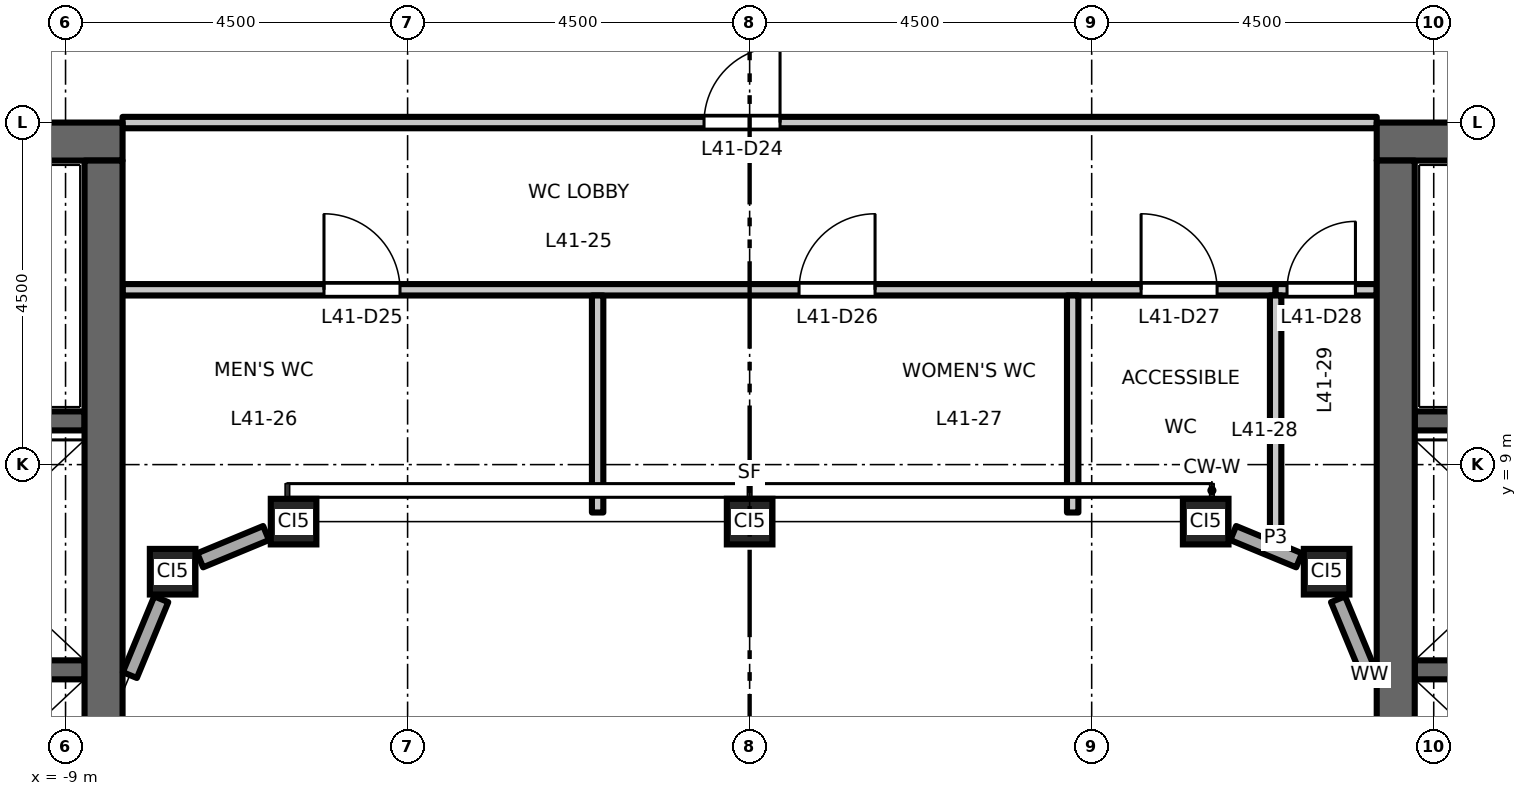
"""IFC4 building model, lengths in metres.
Left out: names, types, materials, properties, quantities, classifications, styles, units other than length and angle.
Written with IfcOpenShell. Run it as: python <this file> out.ifc"""

import sys

from ifc_helpers import new_model, si_unit, direction, frame, frame_2d, origin, origin_2d, place, context, subcontext, project, spatial, rectangle, hollow_rectangle, extrude, element, fill, save


model = new_model("IFC4")
c1 = context("Model", 3, precision=1e-05, world=origin(), true_north=direction((0.0, 1.0)))
c2 = subcontext(c1, "Body", "Model", "MODEL_VIEW")
j1 = project(units=[si_unit("LENGTHUNIT", "METRE"), si_unit("PLANEANGLEUNIT", "RADIAN")], contexts=[c1])
p1 = place(None, origin())
s1 = spatial("IfcSite", under=j1, at=p1, CompositionType="ELEMENT")
p2 = place(p1, origin())
s2 = spatial("IfcBuilding", under=s1, at=p2, CompositionType="ELEMENT")
p3 = place(p2, frame((0.0, 0.0, 192.7)))
s3 = spatial("IfcBuildingStorey", under=s2, at=p3, CompositionType="ELEMENT", Elevation=192.7)
for number, where, z_axis, x_axis in (
    (1, (-7.591, 7.591, 0.0), (0.0, 0.0, 1.0), (1.0, 0.0, 0.0)),
    (2, (-6.0, 8.25, 0.0), (0.0, 0.0, 1.0), (1.0, 0.0, 0.0)),
    (3, (0.0, 8.25, 0.0), (0.0, 0.0, 1.0), (1.0, 0.0, 0.0)),
    (4, (6.0, 8.25, 0.0), (0.0, 0.0, 1.0), (1.0, 0.0, 0.0)),
    (5, (7.591, 7.591, 0.0), (0.0, 0.0, 1.0), (1.0, 0.0, 0.0)),
):
    element("IfcColumn", number, at=place(p3, frame(where, z_axis=z_axis, x_axis=x_axis)), inside=s3, PredefinedType="COLUMN", context=c2, shape_type="SweptSolid", body=[
        extrude(hollow_rectangle(XDim=0.6, YDim=0.6, WallThickness=0.032, at=origin_2d()), origin(), (0.0, 0.0, 1.0), 4.5),
    ])
p4 = place(p3, frame((-8.75, 6.3, 0.0), z_axis=(0.0, 0.0, 1.0), x_axis=(-1.0, 0.0, 0.0)))
e6 = element("IfcWall", 6, at=p4, inside=s3, PredefinedType="SHEAR", context=c2, shape_type="SweptSolid", body=[
    extrude(rectangle(XDim=3.1, YDim=0.25, at=frame_2d((1.55, 0.0))), origin(), (0.0, 0.0, 1.0), 4.35),
])
p5 = place(p3, frame((-8.75, 9.575, 0.0), z_axis=(0.0, 0.0, 1.0), x_axis=(-1.0, 0.0, 0.0)))
e7 = element("IfcWall", 7, at=p5, inside=s3, PredefinedType="SHEAR", context=c2, shape_type="SweptSolid", body=[
    extrude(rectangle(XDim=8.0, YDim=0.25, at=frame_2d((4.0, 0.0))), origin(), (0.0, 0.0, 1.0), 4.35),
])
p6 = place(p5, frame((6.65, 0.0, 0.0)))
e8 = element("IfcOpeningElement", 8, at=p6, cuts=e7, PredefinedType="OPENING", context=c2, shape_type="SweptSolid", body=[
    extrude(rectangle(XDim=1.1, YDim=2.1, at=frame_2d((0.55, 1.05))), frame((0.0, 0.135, 0.0), z_axis=(0.0, -1.0, 0.0), x_axis=(1.0, 0.0, 0.0)), (0.0, 0.0, 1.0), 0.27),
])
p7 = place(p3, frame((-8.25, 13.25, 0.0), z_axis=(0.0, 0.0, 1.0), x_axis=(-1.0, 0.0, 0.0)))
e9 = element("IfcWall", 9, at=p7, inside=s3, PredefinedType="SHEAR", context=c2, shape_type="SweptSolid", body=[
    extrude(rectangle(XDim=13.5, YDim=0.5, at=frame_2d((6.75, 0.0))), origin(), (0.0, 0.0, 1.0), 4.35),
])
p8 = place(p3, frame((-8.5, -13.0, 0.0), z_axis=(0.0, 0.0, 1.0), x_axis=(0.0, 1.0, 0.0)))
e10 = element("IfcWall", 10, at=p8, inside=s3, PredefinedType="SHEAR", context=c2, shape_type="SweptSolid", body=[
    extrude(rectangle(XDim=26.0, YDim=0.5, at=frame_2d((13.0, 0.0))), origin(), (0.0, 0.0, 1.0), 4.35),
])
p9 = place(p3, frame((8.75, 6.3, 0.0), z_axis=(0.0, 0.0, 1.0), x_axis=(1.0, 0.0, 0.0)))
e11 = element("IfcWall", 11, at=p9, inside=s3, PredefinedType="SHEAR", context=c2, shape_type="SweptSolid", body=[
    extrude(rectangle(XDim=3.1, YDim=0.25, at=frame_2d((1.55, 0.0))), origin(), (0.0, 0.0, 1.0), 4.35),
])
p10 = place(p3, frame((8.75, 9.575, 0.0), z_axis=(0.0, 0.0, 1.0), x_axis=(1.0, 0.0, 0.0)))
e12 = element("IfcWall", 12, at=p10, inside=s3, PredefinedType="SHEAR", context=c2, shape_type="SweptSolid", body=[
    extrude(rectangle(XDim=8.0, YDim=0.25, at=frame_2d((4.0, 0.0))), origin(), (0.0, 0.0, 1.0), 4.35),
])
p11 = place(p10, frame((6.65, 0.0, 0.0)))
e13 = element("IfcOpeningElement", 13, at=p11, cuts=e12, PredefinedType="OPENING", context=c2, shape_type="SweptSolid", body=[
    extrude(rectangle(XDim=1.1, YDim=2.1, at=frame_2d((0.55, 1.05))), frame((0.0, 0.135, 0.0), z_axis=(0.0, -1.0, 0.0), x_axis=(1.0, 0.0, 0.0)), (0.0, 0.0, 1.0), 0.27),
])
p12 = place(p3, frame((8.25, 13.25, 0.0), z_axis=(0.0, 0.0, 1.0), x_axis=(1.0, 0.0, 0.0)))
e14 = element("IfcWall", 14, at=p12, inside=s3, PredefinedType="SHEAR", context=c2, shape_type="SweptSolid", body=[
    extrude(rectangle(XDim=13.5, YDim=0.5, at=frame_2d((6.75, 0.0))), origin(), (0.0, 0.0, 1.0), 4.35),
])
p13 = place(p3, frame((8.5, -13.0, 0.0), z_axis=(0.0, 0.0, 1.0), x_axis=(0.0, 1.0, 0.0)))
e15 = element("IfcWall", 15, at=p13, inside=s3, PredefinedType="SHEAR", context=c2, shape_type="SweptSolid", body=[
    extrude(rectangle(XDim=26.0, YDim=0.5, at=frame_2d((13.0, 0.0))), origin(), (0.0, 0.0, 1.0), 4.35),
])
p14 = place(p3, frame((8.154, 6.231, 0.0), z_axis=(0.0, 0.0, 1.0), x_axis=(-0.382704496366, 0.923870807235, 0.0)))
e16 = element("IfcWall", 16, at=p14, inside=s3, PredefinedType="STANDARD", context=c2, shape_type="SweptSolid", body=[
    extrude(rectangle(XDim=1.08, YDim=0.2, at=frame_2d((0.54, 0.0))), origin(), (0.0, 0.0, 1.0), 3.918),
])
for number, where, z_axis, x_axis in (
    (17, (7.229, 7.741, 0.0), (0.0, 0.0, 1.0), (-0.924, 0.383, 0.0)),
    (18, (-6.362, 8.1, 0.0), (0.0, 0.0, 1.0), (-0.924, -0.383, 0.0)),
):
    element("IfcWall", number, at=place(p3, frame(where, z_axis=z_axis, x_axis=x_axis)), inside=s3, PredefinedType="STANDARD", context=c2, shape_type="SweptSolid", body=[
        extrude(rectangle(XDim=0.938, YDim=0.2, at=frame_2d((0.469, 0.0))), origin(), (0.0, 0.0, 1.0), 3.918),
    ])
p15 = place(p3, frame((-7.741, 7.229, 0.0), z_axis=(0.0, 0.0, 1.0), x_axis=(-0.382704496366, -0.923870807235, 0.0)))
e19 = element("IfcWall", 19, at=p15, inside=s3, PredefinedType="STANDARD", context=c2, shape_type="SweptSolid", body=[
    extrude(rectangle(XDim=1.08, YDim=0.2, at=frame_2d((0.54, 0.0))), origin(), (0.0, 0.0, 1.0), 3.918),
])
p16 = place(p3, frame((-8.25, 11.3, 0.0), z_axis=(0.0, 0.0, 1.0), x_axis=(1.0, 0.0, 0.0)))
e20 = element("IfcWall", 20, at=p16, inside=s3, PredefinedType="PARTITIONING", context=c2, shape_type="SweptSolid", body=[
    extrude(rectangle(XDim=15.17, YDim=0.15, at=frame_2d((7.585, 0.0))), origin(), (0.0, 0.0, 1.0), 4.35),
])
p17 = place(p16, frame((2.65, 0.0, 0.0)))
e21 = element("IfcOpeningElement", 21, at=p17, cuts=e20, PredefinedType="OPENING", context=c2, shape_type="SweptSolid", body=[
    extrude(rectangle(XDim=1.0, YDim=2.1, at=frame_2d((0.5, 1.05))), frame((0.0, 0.085, 0.0), z_axis=(0.0, -1.0, 0.0), x_axis=(1.0, 0.0, 0.0)), (0.0, 0.0, 1.0), 0.17),
])
p18 = place(p16, frame((8.9, 0.0, 0.0)))
e22 = element("IfcOpeningElement", 22, at=p18, cuts=e20, PredefinedType="OPENING", context=c2, shape_type="SweptSolid", body=[
    extrude(rectangle(XDim=1.0, YDim=2.1, at=frame_2d((0.5, 1.05))), frame((0.0, 0.085, 0.0), z_axis=(0.0, -1.0, 0.0), x_axis=(1.0, 0.0, 0.0)), (0.0, 0.0, 1.0), 0.17),
])
p19 = place(p16, frame((13.4, 0.0, 0.0)))
e23 = element("IfcOpeningElement", 23, at=p19, cuts=e20, PredefinedType="OPENING", context=c2, shape_type="SweptSolid", body=[
    extrude(rectangle(XDim=1.0, YDim=2.1, at=frame_2d((0.5, 1.05))), frame((0.0, 0.085, 0.0), z_axis=(0.0, -1.0, 0.0), x_axis=(1.0, 0.0, 0.0)), (0.0, 0.0, 1.0), 0.17),
])
p20 = place(p3, frame((6.92, 11.3, 0.0), z_axis=(0.0, 0.0, 1.0), x_axis=(1.0, 0.0, 0.0)))
e24 = element("IfcWall", 24, at=p20, inside=s3, PredefinedType="PARTITIONING", context=c2, shape_type="SweptSolid", body=[
    extrude(rectangle(XDim=1.33, YDim=0.15, at=frame_2d((0.665, 0.0))), origin(), (0.0, 0.0, 1.0), 4.35),
])
p21 = place(p20, frame((0.15, 0.0, 0.0)))
e25 = element("IfcOpeningElement", 25, at=p21, cuts=e24, PredefinedType="OPENING", context=c2, shape_type="SweptSolid", body=[
    extrude(rectangle(XDim=0.9, YDim=2.1, at=frame_2d((0.45, 1.05))), frame((0.0, 0.085, 0.0), z_axis=(0.0, -1.0, 0.0), x_axis=(1.0, 0.0, 0.0)), (0.0, 0.0, 1.0), 0.17),
])
p22 = place(p3, frame((-8.25, 13.5, 0.0), z_axis=(0.0, 0.0, 1.0), x_axis=(1.0, 0.0, 0.0)))
e26 = element("IfcWall", 26, at=p22, inside=s3, PredefinedType="PARTITIONING", context=c2, shape_type="SweptSolid", body=[
    extrude(rectangle(XDim=16.5, YDim=0.15, at=frame_2d((8.25, 0.0))), origin(), (0.0, 0.0, 1.0), 4.35),
])
p23 = place(p22, frame((7.65, 0.0, 0.0)))
e27 = element("IfcOpeningElement", 27, at=p23, cuts=e26, PredefinedType="OPENING", context=c2, shape_type="SweptSolid", body=[
    extrude(rectangle(XDim=1.0, YDim=2.1, at=frame_2d((0.5, 1.05))), frame((0.0, 0.085, 0.0), z_axis=(0.0, -1.0, 0.0), x_axis=(1.0, 0.0, 0.0)), (0.0, 0.0, 1.0), 0.17),
])
for number, where, z_axis, x_axis in (
    (28, (-2.0, 8.37, 0.0), (0.0, 0.0, 1.0), (0.0, 1.0, 0.0)),
    (29, (4.25, 8.37, 0.0), (0.0, 0.0, 1.0), (0.0, 1.0, 0.0)),
):
    element("IfcWall", number, at=place(p3, frame(where, z_axis=z_axis, x_axis=x_axis)), inside=s3, PredefinedType="PARTITIONING", context=c2, shape_type="SweptSolid", body=[
        extrude(rectangle(XDim=2.855, YDim=0.15, at=frame_2d((1.427, 0.0))), origin(), (0.0, 0.0, 1.0), 4.35),
    ])
p24 = place(p3, frame((6.92, 8.029, 0.0), z_axis=(0.0, 0.0, 1.0), x_axis=(0.0, 1.0, 0.0)))
e30 = element("IfcWall", 30, at=p24, inside=s3, PredefinedType="PARTITIONING", context=c2, shape_type="SweptSolid", body=[
    extrude(rectangle(XDim=3.196, YDim=0.15, at=frame_2d((1.598, 0.0))), origin(), (0.0, 0.0, 1.0), 4.35),
])
p25 = place(p23, origin())
e31 = element("IfcDoor", 31, at=p25, inside=s3, OperationType="SINGLE_SWING_RIGHT", PredefinedType="DOOR", context=c2, shape_type="SweptSolid", body=[
    extrude(rectangle(XDim=1.0, YDim=2.1, at=frame_2d((0.5, 1.05))), frame((0.0, 0.025, 0.0), z_axis=(0.0, -1.0, 0.0), x_axis=(1.0, 0.0, 0.0)), (0.0, 0.0, 1.0), 0.05),
])
fill(e27, e31)
p26 = place(p17, origin())
e32 = element("IfcDoor", 32, at=p26, inside=s3, OperationType="SINGLE_SWING_LEFT", PredefinedType="DOOR", context=c2, shape_type="SweptSolid", body=[
    extrude(rectangle(XDim=1.0, YDim=2.1, at=frame_2d((0.5, 1.05))), frame((0.0, 0.025, 0.0), z_axis=(0.0, -1.0, 0.0), x_axis=(1.0, 0.0, 0.0)), (0.0, 0.0, 1.0), 0.05),
])
fill(e21, e32)
p27 = place(p18, origin())
e33 = element("IfcDoor", 33, at=p27, inside=s3, OperationType="SINGLE_SWING_RIGHT", PredefinedType="DOOR", context=c2, shape_type="SweptSolid", body=[
    extrude(rectangle(XDim=1.0, YDim=2.1, at=frame_2d((0.5, 1.05))), frame((0.0, 0.025, 0.0), z_axis=(0.0, -1.0, 0.0), x_axis=(1.0, 0.0, 0.0)), (0.0, 0.0, 1.0), 0.05),
])
fill(e22, e33)
p28 = place(p19, origin())
e34 = element("IfcDoor", 34, at=p28, inside=s3, OperationType="SINGLE_SWING_LEFT", PredefinedType="DOOR", context=c2, shape_type="SweptSolid", body=[
    extrude(rectangle(XDim=1.0, YDim=2.1, at=frame_2d((0.5, 1.05))), frame((0.0, 0.025, 0.0), z_axis=(0.0, -1.0, 0.0), x_axis=(1.0, 0.0, 0.0)), (0.0, 0.0, 1.0), 0.05),
])
fill(e23, e34)
p29 = place(p21, origin())
e35 = element("IfcDoor", 35, at=p29, inside=s3, OperationType="SINGLE_SWING_RIGHT", PredefinedType="DOOR", context=c2, shape_type="SweptSolid", body=[
    extrude(rectangle(XDim=0.9, YDim=2.1, at=frame_2d((0.45, 1.05))), frame((0.0, 0.025, 0.0), z_axis=(0.0, -1.0, 0.0), x_axis=(1.0, 0.0, 0.0)), (0.0, 0.0, 1.0), 0.05),
])
fill(e25, e35)
save(model, sys.argv[1])
